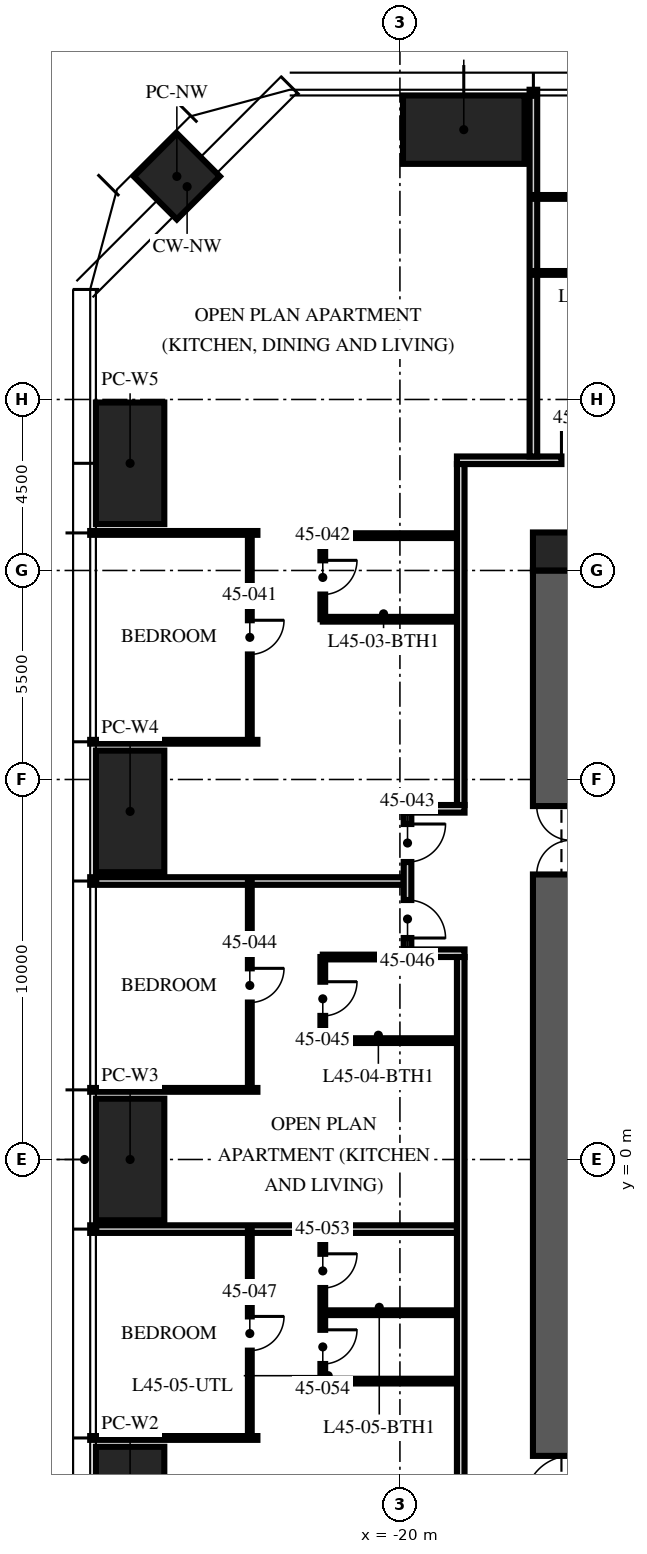
"""IFC4 building model, lengths in metres.
Left out: names, types, materials, properties, quantities, classifications, styles, units other than length and angle.
Written with IfcOpenShell. Run it as: python <this file> out.ifc"""

import sys

from ifc_helpers import new_model, si_unit, direction, frame, frame_2d, origin, origin_2d, place, context, subcontext, project, spatial, rectangle, hollow_rectangle, extrude, element, fill, save


model = new_model("IFC4")
c1 = context("Model", 3, precision=1e-05, world=origin(), true_north=direction((0.0, 1.0)))
c2 = subcontext(c1, "Body", "Model", "MODEL_VIEW")
j1 = project(units=[si_unit("LENGTHUNIT", "METRE"), si_unit("PLANEANGLEUNIT", "RADIAN")], contexts=[c1])
p1 = place(None, origin())
s1 = spatial("IfcSite", under=j1, at=p1, CompositionType="ELEMENT")
p2 = place(p1, origin())
s2 = spatial("IfcBuilding", under=s1, at=p2, CompositionType="ELEMENT")
p3 = place(p2, frame((0.0, 0.0, 178.5)))
s3 = spatial("IfcBuildingStorey", under=s2, at=p3, CompositionType="ELEMENT", Elevation=178.5)
p4 = place(p3, frame((-15.5, -15.5, -0.25), z_axis=(0.0, 0.0, 1.0), x_axis=(0.0, 1.0, 0.0)))
e1 = element("IfcWall", 1, at=p4, inside=s3, PredefinedType="SHEAR", context=c2, shape_type="SweptSolid", body=[
    extrude(rectangle(XDim=31.0, YDim=2.0, at=frame_2d((15.5, 0.0))), origin(), (0.0, 0.0, 1.0), 3.75),
])
p5 = place(p4, frame((6.5, 0.0, 0.25)))
e2 = element("IfcOpeningElement", 2, at=p5, cuts=e1, PredefinedType="OPENING", context=c2, shape_type="SweptSolid", body=[
    extrude(rectangle(XDim=1.2, YDim=2.1, at=frame_2d((0.6, 1.05))), frame((0.0, 1.01, 0.0), z_axis=(0.0, -1.0, 0.0), x_axis=(1.0, 0.0, 0.0)), (0.0, 0.0, 1.0), 2.02),
])
p6 = place(p4, frame((23.0, 0.0, 0.25)))
e3 = element("IfcOpeningElement", 3, at=p6, cuts=e1, PredefinedType="OPENING", context=c2, shape_type="SweptSolid", body=[
    extrude(rectangle(XDim=1.8, YDim=2.1, at=frame_2d((0.9, 1.05))), frame((0.0, 1.01, 0.0), z_axis=(0.0, -1.0, 0.0), x_axis=(1.0, 0.0, 0.0)), (0.0, 0.0, 1.0), 2.02),
])
p7 = place(p3, frame((-16.0, 16.0, -0.25), z_axis=(0.0, 0.0, 1.0), x_axis=(1.0, 0.0, 0.0)))
e4 = element("IfcColumn", 4, at=p7, inside=s3, PredefinedType="COLUMN", context=c2, shape_type="SweptSolid", body=[
    extrude(rectangle(XDim=1.0, YDim=1.0, at=origin_2d()), origin(), (0.0, 0.0, 1.0), 3.75),
])
for number, where, z_axis, x_axis in (
    (5, (-18.32, 27.1, 0.0), (0.0, 0.0, 1.0), (1.0, 0.0, 0.0)),
    (6, (-27.1, -9.16, 0.0), (0.0, 0.0, 1.0), (0.0, 1.0, 0.0)),
    (7, (-27.1, 0.0, 0.0), (0.0, 0.0, 1.0), (0.0, 1.0, 0.0)),
    (8, (-27.1, 9.16, 0.0), (0.0, 0.0, 1.0), (0.0, 1.0, 0.0)),
    (9, (-27.1, 18.32, 0.0), (0.0, 0.0, 1.0), (0.0, 1.0, 0.0)),
):
    element("IfcColumn", number, at=place(p3, frame(where, z_axis=z_axis, x_axis=x_axis)), inside=s3, PredefinedType="COLUMN", context=c2, shape_type="SweptSolid", body=[
        extrude(hollow_rectangle(XDim=3.2, YDim=1.8, WallThickness=0.2, at=origin_2d()), origin(), (0.0, 0.0, 1.0), 3.75),
    ])
p8 = place(p3, frame((-25.87, 25.87, 0.0), z_axis=(0.0, 0.0, 1.0), x_axis=(0.707106781187, 0.707106781187, 0.0)))
e10 = element("IfcColumn", 10, at=p8, inside=s3, PredefinedType="COLUMN", context=c2, shape_type="SweptSolid", body=[
    extrude(hollow_rectangle(XDim=1.6, YDim=1.6, WallThickness=0.1, at=origin_2d()), origin(), (0.0, 0.0, 1.0), 3.75),
])
p9 = place(p3, frame((-18.5, 18.4, 0.0), z_axis=(0.0, 0.0, 1.0), x_axis=(1.0, 0.0, 0.0)))
e11 = element("IfcWall", 11, at=p9, inside=s3, PredefinedType="PARTITIONING", context=c2, shape_type="SweptSolid", body=[
    extrude(rectangle(XDim=10.1, YDim=0.2, at=frame_2d((5.05, 0.0))), origin(), (0.0, 0.0, 1.0), 2.3),
])
p10 = place(p9, frame((2.75, 0.0, 0.0)))
e12 = element("IfcOpeningElement", 12, at=p10, cuts=e11, PredefinedType="OPENING", context=c2, shape_type="SweptSolid", body=[
    extrude(rectangle(XDim=1.0, YDim=2.2, at=frame_2d((0.5, 1.1))), frame((0.0, 0.11, 0.0), z_axis=(0.0, -1.0, 0.0), x_axis=(1.0, 0.0, 0.0)), (0.0, 0.0, 1.0), 0.22),
])
p11 = place(p3, frame((-16.488, 18.5, 0.0), z_axis=(0.0, 0.0, 1.0), x_axis=(0.0, 1.0, 0.0)))
e13 = element("IfcWall", 13, at=p11, inside=s3, PredefinedType="PARTITIONING", context=c2, shape_type="SweptSolid", body=[
    extrude(rectangle(XDim=9.65, YDim=0.2, at=frame_2d((4.825, 0.0))), origin(), (0.0, 0.0, 1.0), 2.81),
])
for number, where, z_axis, x_axis in (
    (14, (-23.75, 16.488, 0.0), (0.0, 0.0, 1.0), (-1.0, 0.0, 0.0)),
    (15, (-23.75, 10.992, 0.0), (0.0, 0.0, 1.0), (-1.0, 0.0, 0.0)),
):
    element("IfcWall", number, at=place(p3, frame(where, z_axis=z_axis, x_axis=x_axis)), inside=s3, PredefinedType="PARTITIONING", context=c2, shape_type="SweptSolid", body=[
        extrude(rectangle(XDim=4.4, YDim=0.1, at=frame_2d((2.2, 0.0))), origin(), (0.0, 0.0, 1.0), 2.81),
    ])
p12 = place(p3, frame((-19.9, 7.328, 0.0), z_axis=(0.0, 0.0, 1.0), x_axis=(-1.0, 0.0, 0.0)))
e16 = element("IfcWall", 16, at=p12, inside=s3, PredefinedType="PARTITIONING", context=c2, shape_type="SweptSolid", body=[
    extrude(rectangle(XDim=8.25, YDim=0.2, at=frame_2d((4.125, 0.0))), origin(), (0.0, 0.0, 1.0), 2.81),
])
p13 = place(p3, frame((-23.75, 1.832, 0.0), z_axis=(0.0, 0.0, 1.0), x_axis=(-1.0, 0.0, 0.0)))
e17 = element("IfcWall", 17, at=p13, inside=s3, PredefinedType="PARTITIONING", context=c2, shape_type="SweptSolid", body=[
    extrude(rectangle(XDim=4.4, YDim=0.1, at=frame_2d((2.2, 0.0))), origin(), (0.0, 0.0, 1.0), 2.81),
])
p14 = place(p3, frame((-18.5, -1.832, 0.0), z_axis=(0.0, 0.0, 1.0), x_axis=(-1.0, 0.0, 0.0)))
e18 = element("IfcWall", 18, at=p14, inside=s3, PredefinedType="PARTITIONING", context=c2, shape_type="SweptSolid", body=[
    extrude(rectangle(XDim=9.65, YDim=0.2, at=frame_2d((4.825, 0.0))), origin(), (0.0, 0.0, 1.0), 2.81),
])
p15 = place(p3, frame((-23.75, -7.328, 0.0), z_axis=(0.0, 0.0, 1.0), x_axis=(-1.0, 0.0, 0.0)))
e19 = element("IfcWall", 19, at=p15, inside=s3, PredefinedType="PARTITIONING", context=c2, shape_type="SweptSolid", body=[
    extrude(rectangle(XDim=4.4, YDim=0.1, at=frame_2d((2.2, 0.0))), origin(), (0.0, 0.0, 1.0), 2.81),
])
p16 = place(p3, frame((-10.992, 25.33, 0.0), z_axis=(0.0, 0.0, 1.0), x_axis=(-1.0, 0.0, 0.0)))
e20 = element("IfcWall", 20, at=p16, inside=s3, PredefinedType="PARTITIONING", context=c2, shape_type="SweptSolid", body=[
    extrude(rectangle(XDim=5.496, YDim=0.1, at=frame_2d((2.748, 0.0))), origin(), (0.0, 0.0, 1.0), 2.81),
])
p17 = place(p16, frame((0.15, 0.0, 0.0)))
e21 = element("IfcOpeningElement", 21, at=p17, cuts=e20, PredefinedType="OPENING", context=c2, shape_type="SweptSolid", body=[
    extrude(rectangle(XDim=0.9, YDim=2.1, at=frame_2d((0.45, 1.05))), frame((0.0, 0.06, 0.0), z_axis=(0.0, -1.0, 0.0), x_axis=(1.0, 0.0, 0.0)), (0.0, 0.0, 1.0), 0.12),
])
p18 = place(p16, frame((2.898, 0.0, 0.0)))
e22 = element("IfcOpeningElement", 22, at=p18, cuts=e20, PredefinedType="OPENING", context=c2, shape_type="SweptSolid", body=[
    extrude(rectangle(XDim=0.9, YDim=2.1, at=frame_2d((0.45, 1.05))), frame((0.0, 0.06, 0.0), z_axis=(0.0, -1.0, 0.0), x_axis=(1.0, 0.0, 0.0)), (0.0, 0.0, 1.0), 0.12),
])
p19 = place(p3, frame((-12.192, 23.33, 0.0), z_axis=(0.0, 0.0, 1.0), x_axis=(-1.0, 0.0, 0.0)))
e23 = element("IfcWall", 23, at=p19, inside=s3, PredefinedType="PARTITIONING", context=c2, shape_type="SweptSolid", body=[
    extrude(rectangle(XDim=4.296, YDim=0.1, at=frame_2d((2.148, 0.0))), origin(), (0.0, 0.0, 1.0), 2.81),
])
p20 = place(p3, frame((-23.95, 16.488, 0.0), z_axis=(0.0, 0.0, 1.0), x_axis=(0.0, -1.0, 0.0)))
e24 = element("IfcWall", 24, at=p20, inside=s3, PredefinedType="PARTITIONING", context=c2, shape_type="SweptSolid", body=[
    extrude(rectangle(XDim=5.496, YDim=0.1, at=frame_2d((2.748, 0.0))), origin(), (0.0, 0.0, 1.0), 2.81),
])
p21 = place(p20, frame((2.298, 0.0, 0.0)))
e25 = element("IfcOpeningElement", 25, at=p21, cuts=e24, PredefinedType="OPENING", context=c2, shape_type="SweptSolid", body=[
    extrude(rectangle(XDim=0.9, YDim=2.1, at=frame_2d((0.45, 1.05))), frame((0.0, 0.06, 0.0), z_axis=(0.0, -1.0, 0.0), x_axis=(1.0, 0.0, 0.0)), (0.0, 0.0, 1.0), 0.12),
])
p22 = place(p3, frame((-22.03, 16.417, 0.0), z_axis=(0.0, 0.0, 1.0), x_axis=(0.0, -1.0, 0.0)))
e26 = element("IfcWall", 26, at=p22, inside=s3, PredefinedType="PARTITIONING", context=c2, shape_type="SweptSolid", body=[
    extrude(rectangle(XDim=2.2, YDim=0.125, at=frame_2d((1.1, 0.0))), origin(), (0.0, 0.0, 1.0), 3.5),
])
p23 = place(p22, frame((0.65, 0.0, 0.0)))
e27 = element("IfcOpeningElement", 27, at=p23, cuts=e26, PredefinedType="OPENING", context=c2, shape_type="SweptSolid", body=[
    extrude(rectangle(XDim=0.9, YDim=2.1, at=frame_2d((0.45, 1.05))), frame((0.0, 0.073, 0.0), z_axis=(0.0, -1.0, 0.0), x_axis=(1.0, 0.0, 0.0)), (0.0, 0.0, 1.0), 0.145),
])
for number, where, z_axis, x_axis in (
    (28, (-18.5, 16.417, 0.0), (0.0, 0.0, 1.0), (-1.0, 0.0, 0.0)),
    (29, (-18.5, 14.217, 0.0), (0.0, 0.0, 1.0), (-1.0, 0.0, 0.0)),
):
    element("IfcWall", number, at=place(p3, frame(where, z_axis=z_axis, x_axis=x_axis)), inside=s3, PredefinedType="PARTITIONING", context=c2, shape_type="SweptSolid", body=[
        extrude(rectangle(XDim=3.53, YDim=0.125, at=frame_2d((1.765, 0.0))), origin(), (0.0, 0.0, 1.0), 3.5),
    ])
p24 = place(p3, frame((-23.95, 7.328, 0.0), z_axis=(0.0, 0.0, 1.0), x_axis=(0.0, -1.0, 0.0)))
e30 = element("IfcWall", 30, at=p24, inside=s3, PredefinedType="PARTITIONING", context=c2, shape_type="SweptSolid", body=[
    extrude(rectangle(XDim=5.496, YDim=0.1, at=frame_2d((2.748, 0.0))), origin(), (0.0, 0.0, 1.0), 2.81),
])
p25 = place(p24, frame((2.298, 0.0, 0.0)))
e31 = element("IfcOpeningElement", 31, at=p25, cuts=e30, PredefinedType="OPENING", context=c2, shape_type="SweptSolid", body=[
    extrude(rectangle(XDim=0.9, YDim=2.1, at=frame_2d((0.45, 1.05))), frame((0.0, 0.06, 0.0), z_axis=(0.0, -1.0, 0.0), x_axis=(1.0, 0.0, 0.0)), (0.0, 0.0, 1.0), 0.12),
])
p26 = place(p3, frame((-22.03, 5.328, 0.0), z_axis=(0.0, 0.0, 1.0), x_axis=(0.0, -1.0, 0.0)))
e32 = element("IfcWall", 32, at=p26, inside=s3, PredefinedType="PARTITIONING", context=c2, shape_type="SweptSolid", body=[
    extrude(rectangle(XDim=2.2, YDim=0.125, at=frame_2d((1.1, 0.0))), origin(), (0.0, 0.0, 1.0), 2.81),
])
p27 = place(p26, frame((0.65, 0.0, 0.0)))
e33 = element("IfcOpeningElement", 33, at=p27, cuts=e32, PredefinedType="OPENING", context=c2, shape_type="SweptSolid", body=[
    extrude(rectangle(XDim=0.9, YDim=2.1, at=frame_2d((0.45, 1.05))), frame((0.0, 0.073, 0.0), z_axis=(0.0, -1.0, 0.0), x_axis=(1.0, 0.0, 0.0)), (0.0, 0.0, 1.0), 0.145),
])
p28 = place(p3, frame((-19.97, 5.328, 0.0), z_axis=(0.0, 0.0, 1.0), x_axis=(-1.0, 0.0, 0.0)))
e34 = element("IfcWall", 34, at=p28, inside=s3, PredefinedType="PARTITIONING", context=c2, shape_type="SweptSolid", body=[
    extrude(rectangle(XDim=2.06, YDim=0.125, at=frame_2d((1.03, 0.0))), origin(), (0.0, 0.0, 1.0), 3.5),
])
p29 = place(p3, frame((-18.5, 3.128, 0.0), z_axis=(0.0, 0.0, 1.0), x_axis=(-1.0, 0.0, 0.0)))
e35 = element("IfcWall", 35, at=p29, inside=s3, PredefinedType="PARTITIONING", context=c2, shape_type="SweptSolid", body=[
    extrude(rectangle(XDim=3.53, YDim=0.125, at=frame_2d((1.765, 0.0))), origin(), (0.0, 0.0, 1.0), 3.5),
])
p30 = place(p3, frame((-23.95, -1.832, 0.0), z_axis=(0.0, 0.0, 1.0), x_axis=(0.0, -1.0, 0.0)))
e36 = element("IfcWall", 36, at=p30, inside=s3, PredefinedType="PARTITIONING", context=c2, shape_type="SweptSolid", body=[
    extrude(rectangle(XDim=5.496, YDim=0.1, at=frame_2d((2.748, 0.0))), origin(), (0.0, 0.0, 1.0), 2.81),
])
p31 = place(p30, frame((2.298, 0.0, 0.0)))
e37 = element("IfcOpeningElement", 37, at=p31, cuts=e36, PredefinedType="OPENING", context=c2, shape_type="SweptSolid", body=[
    extrude(rectangle(XDim=0.9, YDim=2.1, at=frame_2d((0.45, 1.05))), frame((0.0, 0.06, 0.0), z_axis=(0.0, -1.0, 0.0), x_axis=(1.0, 0.0, 0.0)), (0.0, 0.0, 1.0), 0.12),
])
p32 = place(p3, frame((-22.03, -1.832, 0.0), z_axis=(0.0, 0.0, 1.0), x_axis=(0.0, -1.0, 0.0)))
e38 = element("IfcWall", 38, at=p32, inside=s3, PredefinedType="PARTITIONING", context=c2, shape_type="SweptSolid", body=[
    extrude(rectangle(XDim=4.0, YDim=0.125, at=frame_2d((2.0, 0.0))), origin(), (0.0, 0.0, 1.0), 2.81),
])
p33 = place(p32, frame((0.65, 0.0, 0.0)))
e39 = element("IfcOpeningElement", 39, at=p33, cuts=e38, PredefinedType="OPENING", context=c2, shape_type="SweptSolid", body=[
    extrude(rectangle(XDim=0.9, YDim=2.1, at=frame_2d((0.45, 1.05))), frame((0.0, 0.073, 0.0), z_axis=(0.0, -1.0, 0.0), x_axis=(1.0, 0.0, 0.0)), (0.0, 0.0, 1.0), 0.145),
])
p34 = place(p32, frame((2.65, 0.0, 0.0)))
e40 = element("IfcOpeningElement", 40, at=p34, cuts=e38, PredefinedType="OPENING", context=c2, shape_type="SweptSolid", body=[
    extrude(rectangle(XDim=0.9, YDim=2.1, at=frame_2d((0.45, 1.05))), frame((0.0, 0.073, 0.0), z_axis=(0.0, -1.0, 0.0), x_axis=(1.0, 0.0, 0.0)), (0.0, 0.0, 1.0), 0.145),
])
for number, where, z_axis, x_axis in (
    (41, (-18.5, -4.032, 0.0), (0.0, 0.0, 1.0), (-1.0, 0.0, 0.0)),
    (42, (-18.5, -5.832, 0.0), (0.0, 0.0, 1.0), (-1.0, 0.0, 0.0)),
):
    element("IfcWall", number, at=place(p3, frame(where, z_axis=z_axis, x_axis=x_axis)), inside=s3, PredefinedType="PARTITIONING", context=c2, shape_type="SweptSolid", body=[
        extrude(rectangle(XDim=3.53, YDim=0.125, at=frame_2d((1.765, 0.0))), origin(), (0.0, 0.0, 1.0), 3.5),
    ])
p35 = place(p3, frame((-18.4, 18.3, 0.0), z_axis=(0.0, 0.0, 1.0), x_axis=(0.0, -1.0, 0.0)))
e43 = element("IfcWall", 43, at=p35, inside=s3, PredefinedType="PARTITIONING", context=c2, shape_type="SweptSolid", body=[
    extrude(rectangle(XDim=8.972, YDim=0.2, at=frame_2d((4.486, 0.0))), origin(), (0.0, 0.0, 1.0), 2.3),
])
p36 = place(p3, frame((-18.3, 9.228, 0.0), z_axis=(0.0, 0.0, 1.0), x_axis=(-1.0, 0.0, 0.0)))
e44 = element("IfcWall", 44, at=p36, inside=s3, PredefinedType="PARTITIONING", context=c2, shape_type="SweptSolid", body=[
    extrude(rectangle(XDim=1.6, YDim=0.2, at=frame_2d((0.8, 0.0))), origin(), (0.0, 0.0, 1.0), 2.7),
])
p37 = place(p3, frame((-18.3, 5.428, 0.0), z_axis=(0.0, 0.0, 1.0), x_axis=(-1.0, 0.0, 0.0)))
e45 = element("IfcWall", 45, at=p37, inside=s3, PredefinedType="PARTITIONING", context=c2, shape_type="SweptSolid", body=[
    extrude(rectangle(XDim=1.6, YDim=0.2, at=frame_2d((0.8, 0.0))), origin(), (0.0, 0.0, 1.0), 3.5),
])
p38 = place(p3, frame((-19.8, 9.128, 0.0), z_axis=(0.0, 0.0, 1.0), x_axis=(0.0, -1.0, 0.0)))
e46 = element("IfcWall", 46, at=p38, inside=s3, PredefinedType="PARTITIONING", context=c2, shape_type="SweptSolid", body=[
    extrude(rectangle(XDim=3.6, YDim=0.2, at=frame_2d((1.8, 0.0))), origin(), (0.0, 0.0, 1.0), 2.7),
])
p39 = place(p38, frame((0.3, 0.0, 0.0)))
e47 = element("IfcOpeningElement", 47, at=p39, cuts=e46, PredefinedType="OPENING", context=c2, shape_type="SweptSolid", body=[
    extrude(rectangle(XDim=1.0, YDim=2.2, at=frame_2d((0.5, 1.1))), frame((0.0, 0.11, 0.0), z_axis=(0.0, -1.0, 0.0), x_axis=(1.0, 0.0, 0.0)), (0.0, 0.0, 1.0), 0.22),
])
p40 = place(p38, frame((2.3, 0.0, 0.0)))
e48 = element("IfcOpeningElement", 48, at=p40, cuts=e46, PredefinedType="OPENING", context=c2, shape_type="SweptSolid", body=[
    extrude(rectangle(XDim=1.0, YDim=2.2, at=frame_2d((0.5, 1.1))), frame((0.0, 0.11, 0.0), z_axis=(0.0, -1.0, 0.0), x_axis=(1.0, 0.0, 0.0)), (0.0, 0.0, 1.0), 0.22),
])
p41 = place(p3, frame((-18.4, 5.328, 0.0), z_axis=(0.0, 0.0, 1.0), x_axis=(0.0, -1.0, 0.0)))
e49 = element("IfcWall", 49, at=p41, inside=s3, PredefinedType="PARTITIONING", context=c2, shape_type="SweptSolid", body=[
    extrude(rectangle(XDim=23.628, YDim=0.2, at=frame_2d((11.814, 0.0))), origin(), (0.0, 0.0, 1.0), 2.3),
])
p42 = place(p41, frame((21.68, 0.0, 0.0)))
e50 = element("IfcOpeningElement", 50, at=p42, cuts=e49, PredefinedType="OPENING", context=c2, shape_type="SweptSolid", body=[
    extrude(rectangle(XDim=1.0, YDim=2.2, at=frame_2d((0.5, 1.1))), frame((0.0, 0.11, 0.0), z_axis=(0.0, -1.0, 0.0), x_axis=(1.0, 0.0, 0.0)), (0.0, 0.0, 1.0), 0.22),
])
p43 = place(p10, origin())
e51 = element("IfcDoor", 51, at=p43, inside=s3, OperationType="SINGLE_SWING_LEFT", PredefinedType="DOOR", context=c2, shape_type="SweptSolid", body=[
    extrude(rectangle(XDim=1.0, YDim=2.2, at=frame_2d((0.5, 1.1))), frame((0.0, 0.025, 0.0), z_axis=(0.0, -1.0, 0.0), x_axis=(1.0, 0.0, 0.0)), (0.0, 0.0, 1.0), 0.05),
])
fill(e12, e51)
p44 = place(p21, origin())
e52 = element("IfcDoor", 52, at=p44, inside=s3, OperationType="SINGLE_SWING_LEFT", PredefinedType="DOOR", context=c2, shape_type="SweptSolid", body=[
    extrude(rectangle(XDim=0.9, YDim=2.1, at=frame_2d((0.45, 1.05))), frame((0.0, 0.025, 0.0), z_axis=(0.0, -1.0, 0.0), x_axis=(1.0, 0.0, 0.0)), (0.0, 0.0, 1.0), 0.05),
])
fill(e25, e52)
p45 = place(p23, origin())
e53 = element("IfcDoor", 53, at=p45, inside=s3, OperationType="SINGLE_SWING_LEFT", PredefinedType="DOOR", context=c2, shape_type="SweptSolid", body=[
    extrude(rectangle(XDim=0.9, YDim=2.1, at=frame_2d((0.45, 1.05))), frame((0.0, 0.025, 0.0), z_axis=(0.0, -1.0, 0.0), x_axis=(1.0, 0.0, 0.0)), (0.0, 0.0, 1.0), 0.05),
])
fill(e27, e53)
p46 = place(p39, origin())
e54 = element("IfcDoor", 54, at=p46, inside=s3, OperationType="SINGLE_SWING_LEFT", PredefinedType="DOOR", context=c2, shape_type="SweptSolid", body=[
    extrude(rectangle(XDim=1.0, YDim=2.2, at=frame_2d((0.5, 1.1))), frame((0.0, 0.025, 0.0), z_axis=(0.0, -1.0, 0.0), x_axis=(1.0, 0.0, 0.0)), (0.0, 0.0, 1.0), 0.05),
])
fill(e47, e54)
p47 = place(p25, origin())
e55 = element("IfcDoor", 55, at=p47, inside=s3, OperationType="SINGLE_SWING_LEFT", PredefinedType="DOOR", context=c2, shape_type="SweptSolid", body=[
    extrude(rectangle(XDim=0.9, YDim=2.1, at=frame_2d((0.45, 1.05))), frame((0.0, 0.025, 0.0), z_axis=(0.0, -1.0, 0.0), x_axis=(1.0, 0.0, 0.0)), (0.0, 0.0, 1.0), 0.05),
])
fill(e31, e55)
p48 = place(p27, origin())
e56 = element("IfcDoor", 56, at=p48, inside=s3, OperationType="SINGLE_SWING_LEFT", PredefinedType="DOOR", context=c2, shape_type="SweptSolid", body=[
    extrude(rectangle(XDim=0.9, YDim=2.1, at=frame_2d((0.45, 1.05))), frame((0.0, 0.025, 0.0), z_axis=(0.0, -1.0, 0.0), x_axis=(1.0, 0.0, 0.0)), (0.0, 0.0, 1.0), 0.05),
])
fill(e33, e56)
p49 = place(p40, origin())
e57 = element("IfcDoor", 57, at=p49, inside=s3, OperationType="SINGLE_SWING_RIGHT", PredefinedType="DOOR", context=c2, shape_type="SweptSolid", body=[
    extrude(rectangle(XDim=1.0, YDim=2.2, at=frame_2d((0.5, 1.1))), frame((0.0, 0.025, 0.0), z_axis=(0.0, -1.0, 0.0), x_axis=(1.0, 0.0, 0.0)), (0.0, 0.0, 1.0), 0.05),
])
fill(e48, e57)
p50 = place(p31, origin())
e58 = element("IfcDoor", 58, at=p50, inside=s3, OperationType="SINGLE_SWING_LEFT", PredefinedType="DOOR", context=c2, shape_type="SweptSolid", body=[
    extrude(rectangle(XDim=0.9, YDim=2.1, at=frame_2d((0.45, 1.05))), frame((0.0, 0.025, 0.0), z_axis=(0.0, -1.0, 0.0), x_axis=(1.0, 0.0, 0.0)), (0.0, 0.0, 1.0), 0.05),
])
fill(e37, e58)
p51 = place(p33, origin())
e59 = element("IfcDoor", 59, at=p51, inside=s3, OperationType="SINGLE_SWING_LEFT", PredefinedType="DOOR", context=c2, shape_type="SweptSolid", body=[
    extrude(rectangle(XDim=0.9, YDim=2.1, at=frame_2d((0.45, 1.05))), frame((0.0, 0.025, 0.0), z_axis=(0.0, -1.0, 0.0), x_axis=(1.0, 0.0, 0.0)), (0.0, 0.0, 1.0), 0.05),
])
fill(e39, e59)
p52 = place(p34, origin())
e60 = element("IfcDoor", 60, at=p52, inside=s3, OperationType="SINGLE_SWING_LEFT", PredefinedType="DOOR", context=c2, shape_type="SweptSolid", body=[
    extrude(rectangle(XDim=0.9, YDim=2.1, at=frame_2d((0.45, 1.05))), frame((0.0, 0.025, 0.0), z_axis=(0.0, -1.0, 0.0), x_axis=(1.0, 0.0, 0.0)), (0.0, 0.0, 1.0), 0.05),
])
fill(e40, e60)
save(model, sys.argv[1])
